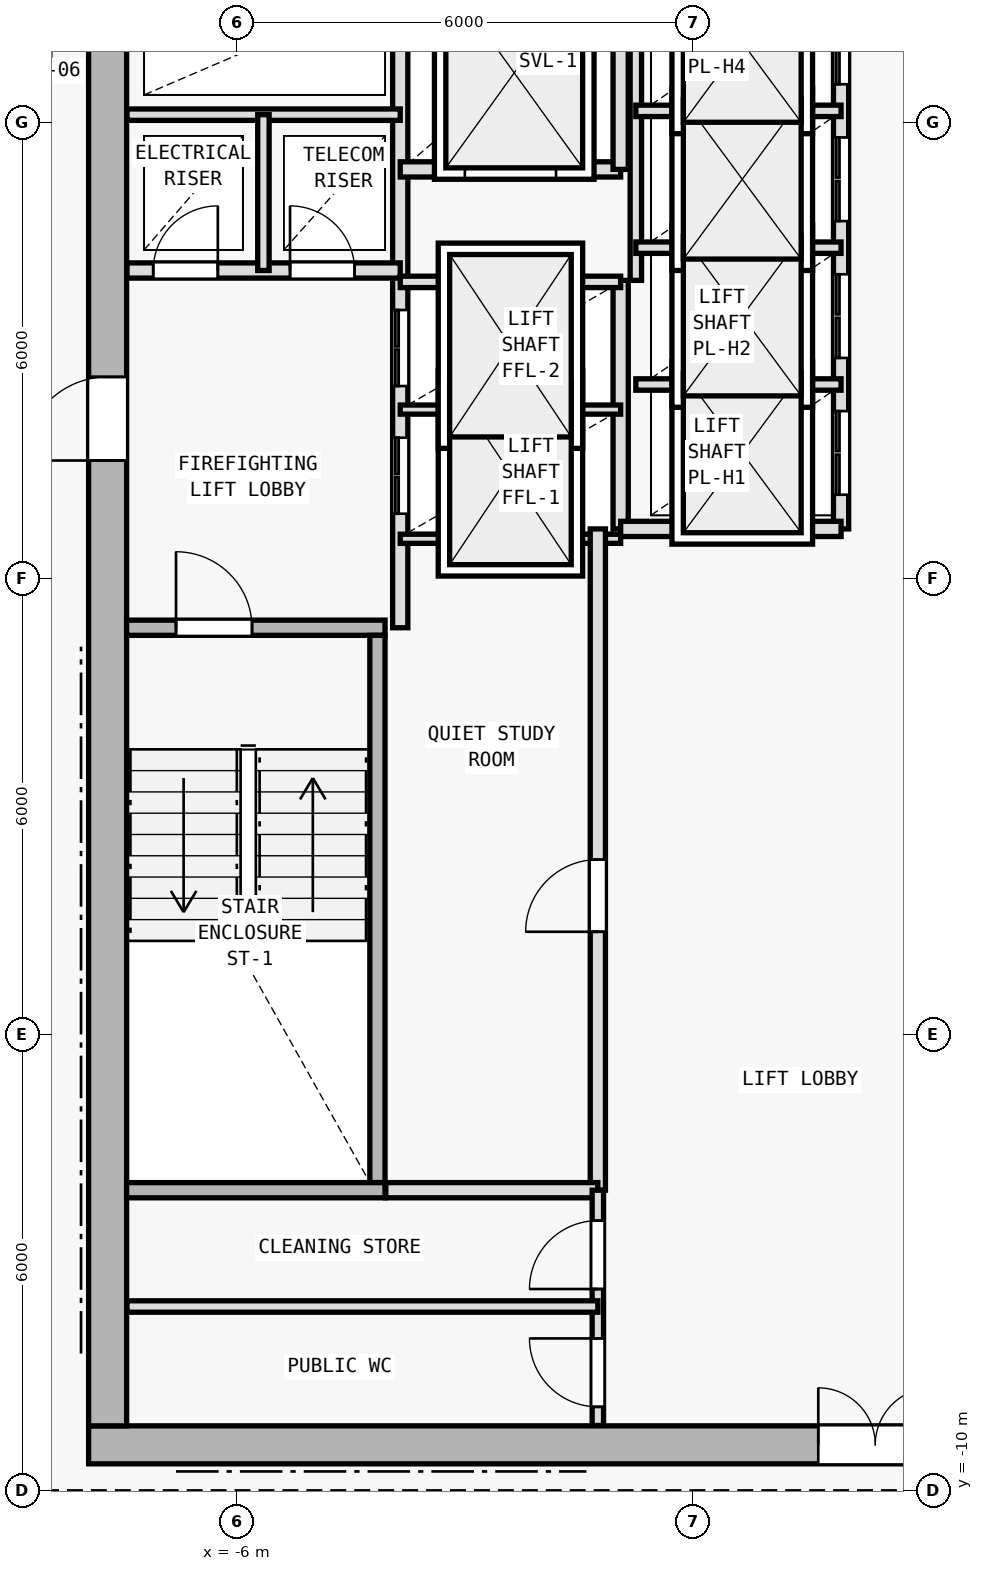
"""IFC4 building model, lengths in metres.
Left out: names, types, materials, properties, quantities, classifications, styles, units other than length and angle.
Written with IfcOpenShell. Run it as: python <this file> out.ifc"""

import sys

from ifc_helpers import new_model, si_unit, direction, frame, frame_2d, origin, origin_2d, place, context, subcontext, project, spatial, rectangle, i_section, extrude, element, fill, save


model = new_model("IFC4")
c1 = context("Model", 3, precision=1e-05, world=origin(), true_north=direction((0.0, 1.0)))
c2 = subcontext(c1, "Body", "Model", "MODEL_VIEW")
j1 = project(units=[si_unit("LENGTHUNIT", "METRE"), si_unit("PLANEANGLEUNIT", "RADIAN")], contexts=[c1])
p1 = place(None, origin())
s1 = spatial("IfcSite", under=j1, at=p1, CompositionType="ELEMENT")
p2 = place(p1, origin())
s2 = spatial("IfcBuilding", under=s1, at=p2, CompositionType="ELEMENT")
p3 = place(p2, frame((0.0, 0.0, 237.9)))
s3 = spatial("IfcBuildingStorey", under=s2, at=p3, CompositionType="ELEMENT", Elevation=237.9)
for number, where, z_axis, x_axis in (
    (1, (-7.7, -9.4, 0.0), (0.0, 0.0, 1.0), (1.0, 0.0, 0.0)),
    (2, (0.0, -9.4, 0.0), (0.0, 0.0, 1.0), (1.0, 0.0, 0.0)),
    (3, (-7.7, 2.0, 0.0), (0.0, 0.0, 1.0), (1.0, 0.0, 0.0)),
):
    element("IfcColumn", number, at=place(p3, frame(where, z_axis=z_axis, x_axis=x_axis)), inside=s3, PredefinedType="COLUMN", context=c2, shape_type="SweptSolid", body=[
        extrude(i_section(OverallWidth=0.398, OverallDepth=0.387, WebThickness=0.013, FlangeThickness=0.022, FilletRadius=0.015, at=origin_2d()), origin(), (0.0, 0.0, 1.0), 3.6),
    ])
p4 = place(p3, frame((-7.95, -9.4, 0.0), z_axis=(0.0, 0.0, 1.0), x_axis=(1.0, 0.0, 0.0)))
e4 = element("IfcWall", 4, at=p4, inside=s3, PredefinedType="SHEAR", context=c2, shape_type="SweptSolid", body=[
    extrude(rectangle(XDim=15.9, YDim=0.5, at=frame_2d((7.95, 0.0))), origin(), (0.0, 0.0, 1.0), 3.28),
])
p5 = place(p4, frame((9.6, 0.0, 0.0)))
e5 = element("IfcOpeningElement", 5, at=p5, cuts=e4, PredefinedType="OPENING", context=c2, shape_type="SweptSolid", body=[
    extrude(rectangle(XDim=1.5, YDim=2.2, at=frame_2d((0.75, 1.1))), frame((0.0, 0.26, 0.0), z_axis=(0.0, -1.0, 0.0), x_axis=(1.0, 0.0, 0.0)), (0.0, 0.0, 1.0), 0.52),
])
p6 = place(p3, frame((-7.7, -9.15, 0.0), z_axis=(0.0, 0.0, 1.0), x_axis=(0.0, 1.0, 0.0)))
e6 = element("IfcWall", 6, at=p6, inside=s3, PredefinedType="SHEAR", context=c2, shape_type="SweptSolid", body=[
    extrude(rectangle(XDim=19.1, YDim=0.5, at=frame_2d((9.55, 0.0))), origin(), (0.0, 0.0, 1.0), 3.28),
])
p7 = place(p6, frame((12.7, 0.0, 0.0)))
e7 = element("IfcOpeningElement", 7, at=p7, cuts=e6, PredefinedType="OPENING", context=c2, shape_type="SweptSolid", body=[
    extrude(rectangle(XDim=1.1, YDim=2.15, at=frame_2d((0.55, 1.075))), frame((0.0, 0.26, 0.0), z_axis=(0.0, -1.0, 0.0), x_axis=(1.0, 0.0, 0.0)), (0.0, 0.0, 1.0), 0.52),
])
p8 = place(p3, frame((-7.45, 1.35, 0.0), z_axis=(0.0, 0.0, 1.0), x_axis=(1.0, 0.0, 0.0)))
e8 = element("IfcWall", 8, at=p8, inside=s3, PredefinedType="SOLIDWALL", context=c2, shape_type="SweptSolid", body=[
    extrude(rectangle(XDim=3.4, YDim=0.2, at=frame_2d((1.7, 0.0))), origin(), (0.0, 0.0, 1.0), 3.28),
])
p9 = place(p8, frame((0.65, 0.0, 0.0)))
e9 = element("IfcOpeningElement", 9, at=p9, cuts=e8, PredefinedType="OPENING", context=c2, shape_type="SweptSolid", body=[
    extrude(rectangle(XDim=1.0, YDim=2.15, at=frame_2d((0.5, 1.075))), frame((0.0, 0.11, 0.0), z_axis=(0.0, -1.0, 0.0), x_axis=(1.0, 0.0, 0.0)), (0.0, 0.0, 1.0), 0.22),
])
p10 = place(p3, frame((-4.15, -5.95, 0.0), z_axis=(0.0, 0.0, 1.0), x_axis=(0.0, 1.0, 0.0)))
e10 = element("IfcWall", 10, at=p10, inside=s3, PredefinedType="SOLIDWALL", context=c2, shape_type="SweptSolid", body=[
    extrude(rectangle(XDim=7.2, YDim=0.2, at=frame_2d((3.6, 0.0))), origin(), (0.0, 0.0, 1.0), 3.28),
])
p11 = place(p3, frame((-3.85, 1.35, 0.0), z_axis=(0.0, 0.0, 1.0), x_axis=(0.0, 1.0, 0.0)))
e11 = element("IfcWall", 11, at=p11, inside=s3, PredefinedType="SOLIDWALL", context=c2, shape_type="SweptSolid", body=[
    extrude(rectangle(XDim=8.595, YDim=0.2, at=frame_2d((4.297, 0.0))), origin(), (0.0, 0.0, 1.0), 3.28),
])
p12 = place(p11, frame((1.5, 0.0, 0.0)))
e12 = element("IfcOpeningElement", 12, at=p12, cuts=e11, PredefinedType="OPENING", context=c2, shape_type="SweptSolid", body=[
    extrude(rectangle(XDim=1.0, YDim=2.15, at=frame_2d((0.5, 1.075))), frame((0.0, 0.11, 0.0), z_axis=(0.0, -1.0, 0.0), x_axis=(1.0, 0.0, 0.0)), (0.0, 0.0, 1.0), 0.22),
])
p13 = place(p11, frame((3.18, 0.0, 0.0)))
e13 = element("IfcOpeningElement", 13, at=p13, cuts=e11, PredefinedType="OPENING", context=c2, shape_type="SweptSolid", body=[
    extrude(rectangle(XDim=1.0, YDim=2.15, at=frame_2d((0.5, 1.075))), frame((0.0, 0.11, 0.0), z_axis=(0.0, -1.0, 0.0), x_axis=(1.0, 0.0, 0.0)), (0.0, 0.0, 1.0), 0.22),
])
p14 = place(p3, frame((-7.445, 6.05, 0.0), z_axis=(0.0, 0.0, 1.0), x_axis=(1.0, 0.0, 0.0)))
e14 = element("IfcWall", 14, at=p14, inside=s3, PredefinedType="SOLIDWALL", context=c2, shape_type="SweptSolid", body=[
    extrude(rectangle(XDim=3.595, YDim=0.2, at=frame_2d((1.797, 0.0))), origin(), (0.0, 0.0, 1.0), 3.28),
])
p15 = place(p14, frame((0.345, 0.0, 0.0)))
e15 = element("IfcOpeningElement", 15, at=p15, cuts=e14, PredefinedType="OPENING", context=c2, shape_type="SweptSolid", body=[
    extrude(rectangle(XDim=0.85, YDim=2.1, at=frame_2d((0.425, 1.05))), frame((0.0, 0.11, 0.0), z_axis=(0.0, -1.0, 0.0), x_axis=(1.0, 0.0, 0.0)), (0.0, 0.0, 1.0), 0.22),
])
p16 = place(p14, frame((2.145, 0.0, 0.0)))
e16 = element("IfcOpeningElement", 16, at=p16, cuts=e14, PredefinedType="OPENING", context=c2, shape_type="SweptSolid", body=[
    extrude(rectangle(XDim=0.85, YDim=2.1, at=frame_2d((0.425, 1.05))), frame((0.0, 0.11, 0.0), z_axis=(0.0, -1.0, 0.0), x_axis=(1.0, 0.0, 0.0)), (0.0, 0.0, 1.0), 0.22),
])
p17 = place(p3, frame((-7.445, 8.1, 0.0), z_axis=(0.0, 0.0, 1.0), x_axis=(1.0, 0.0, 0.0)))
e17 = element("IfcWall", 17, at=p17, inside=s3, PredefinedType="PARTITIONING", context=c2, shape_type="SweptSolid", body=[
    extrude(rectangle(XDim=3.595, YDim=0.15, at=frame_2d((1.797, 0.0))), origin(), (0.0, 0.0, 1.0), 3.28),
])
p18 = place(p3, frame((-5.65, 6.05, 0.0), z_axis=(0.0, 0.0, 1.0), x_axis=(0.0, 1.0, 0.0)))
e18 = element("IfcWall", 18, at=p18, inside=s3, PredefinedType="PARTITIONING", context=c2, shape_type="SweptSolid", body=[
    extrude(rectangle(XDim=2.05, YDim=0.15, at=frame_2d((1.025, 0.0))), origin(), (0.0, 0.0, 1.0), 3.28),
])
p19 = place(p3, frame((-0.95, 2.65, 0.0), z_axis=(0.0, 0.0, 1.0), x_axis=(0.0, 1.0, 0.0)))
e19 = element("IfcWall", 19, at=p19, inside=s3, PredefinedType="SOLIDWALL", context=c2, shape_type="SweptSolid", body=[
    extrude(rectangle(XDim=3.27, YDim=0.2, at=frame_2d((1.635, 0.0))), origin(), (0.0, 0.0, 1.0), 3.28),
])
for number, where, z_axis, x_axis in (
    (20, (-3.85, 2.52, 0.0), (0.0, 0.0, 1.0), (1.0, 0.0, 0.0)),
    (21, (-3.85, 4.22, 0.0), (0.0, 0.0, 1.0), (1.0, 0.0, 0.0)),
):
    element("IfcWall", number, at=place(p3, frame(where, z_axis=z_axis, x_axis=x_axis)), inside=s3, PredefinedType="PARTITIONING", context=c2, shape_type="SweptSolid", body=[
        extrude(rectangle(XDim=2.9, YDim=0.12, at=frame_2d((1.45, 0.0))), origin(), (0.0, 0.0, 1.0), 3.28),
    ])
p20 = place(p3, frame((-3.85, 5.9, 0.0), z_axis=(0.0, 0.0, 1.0), x_axis=(1.0, 0.0, 0.0)))
e22 = element("IfcWall", 22, at=p20, inside=s3, PredefinedType="PARTITIONING", context=c2, shape_type="SweptSolid", body=[
    extrude(rectangle(XDim=2.9, YDim=0.15, at=frame_2d((1.45, 0.0))), origin(), (0.0, 0.0, 1.0), 3.28),
])
p21 = place(p3, frame((-3.85, 7.38, 0.0), z_axis=(0.0, 0.0, 1.0), x_axis=(1.0, 0.0, 0.0)))
e23 = element("IfcWall", 23, at=p21, inside=s3, PredefinedType="SOLIDWALL", context=c2, shape_type="SweptSolid", body=[
    extrude(rectangle(XDim=2.9, YDim=0.2, at=frame_2d((1.45, 0.0))), origin(), (0.0, 0.0, 1.0), 3.28),
])
p22 = place(p21, frame((0.85, 0.0, 0.0)))
e24 = element("IfcOpeningElement", 24, at=p22, cuts=e23, PredefinedType="OPENING", context=c2, shape_type="SweptSolid", body=[
    extrude(rectangle(XDim=1.2, YDim=2.2, at=frame_2d((0.6, 1.1))), frame((0.0, 0.11, 0.0), z_axis=(0.0, -1.0, 0.0), x_axis=(1.0, 0.0, 0.0)), (0.0, 0.0, 1.0), 0.22),
])
p23 = place(p3, frame((-0.95, 7.38, 0.0), z_axis=(0.0, 0.0, 1.0), x_axis=(0.0, 1.0, 0.0)))
e25 = element("IfcWall", 25, at=p23, inside=s3, PredefinedType="SOLIDWALL", context=c2, shape_type="SweptSolid", body=[
    extrude(rectangle(XDim=2.565, YDim=0.2, at=frame_2d((1.283, 0.0))), origin(), (0.0, 0.0, 1.0), 3.28),
])
p24 = place(p3, frame((-1.25, -6.05, 0.0), z_axis=(0.0, 0.0, 1.0), x_axis=(0.0, 1.0, 0.0)))
e26 = element("IfcWall", 26, at=p24, inside=s3, PredefinedType="SOLIDWALL", context=c2, shape_type="SweptSolid", body=[
    extrude(rectangle(XDim=8.7, YDim=0.2, at=frame_2d((4.35, 0.0))), origin(), (0.0, 0.0, 1.0), 3.28),
])
p25 = place(p24, frame((3.4, 0.0, 0.0)))
e27 = element("IfcOpeningElement", 27, at=p25, cuts=e26, PredefinedType="OPENING", context=c2, shape_type="SweptSolid", body=[
    extrude(rectangle(XDim=0.95, YDim=2.1, at=frame_2d((0.475, 1.05))), frame((0.0, 0.11, 0.0), z_axis=(0.0, -1.0, 0.0), x_axis=(1.0, 0.0, 0.0)), (0.0, 0.0, 1.0), 0.22),
])
p26 = place(p3, frame((1.95, 2.65, 0.0), z_axis=(0.0, 0.0, 1.0), x_axis=(0.0, 1.0, 0.0)))
e28 = element("IfcWall", 28, at=p26, inside=s3, PredefinedType="SOLIDWALL", context=c2, shape_type="SweptSolid", body=[
    extrude(rectangle(XDim=7.295, YDim=0.2, at=frame_2d((3.647, 0.0))), origin(), (0.0, 0.0, 1.0), 3.28),
])
p27 = place(p26, frame((0.45, 0.0, 0.0)))
e29 = element("IfcOpeningElement", 29, at=p27, cuts=e28, PredefinedType="OPENING", context=c2, shape_type="SweptSolid", body=[
    extrude(rectangle(XDim=1.1, YDim=2.15, at=frame_2d((0.55, 1.075))), frame((0.0, 0.11, 0.0), z_axis=(0.0, -1.0, 0.0), x_axis=(1.0, 0.0, 0.0)), (0.0, 0.0, 1.0), 0.22),
])
p28 = place(p26, frame((2.25, 0.0, 0.0)))
e30 = element("IfcOpeningElement", 30, at=p28, cuts=e28, PredefinedType="OPENING", context=c2, shape_type="SweptSolid", body=[
    extrude(rectangle(XDim=1.1, YDim=2.15, at=frame_2d((0.55, 1.075))), frame((0.0, 0.11, 0.0), z_axis=(0.0, -1.0, 0.0), x_axis=(1.0, 0.0, 0.0)), (0.0, 0.0, 1.0), 0.22),
])
p29 = place(p26, frame((4.05, 0.0, 0.0)))
e31 = element("IfcOpeningElement", 31, at=p29, cuts=e28, PredefinedType="OPENING", context=c2, shape_type="SweptSolid", body=[
    extrude(rectangle(XDim=1.1, YDim=2.15, at=frame_2d((0.55, 1.075))), frame((0.0, 0.11, 0.0), z_axis=(0.0, -1.0, 0.0), x_axis=(1.0, 0.0, 0.0)), (0.0, 0.0, 1.0), 0.22),
])
p30 = place(p26, frame((5.85, 0.0, 0.0)))
e32 = element("IfcOpeningElement", 32, at=p30, cuts=e28, PredefinedType="OPENING", context=c2, shape_type="SweptSolid", body=[
    extrude(rectangle(XDim=1.1, YDim=2.15, at=frame_2d((0.55, 1.075))), frame((0.0, 0.11, 0.0), z_axis=(0.0, -1.0, 0.0), x_axis=(1.0, 0.0, 0.0)), (0.0, 0.0, 1.0), 0.22),
])
p31 = place(p3, frame((-0.95, 2.65, 0.0), z_axis=(0.0, 0.0, 1.0), x_axis=(1.0, 0.0, 0.0)))
e33 = element("IfcWall", 33, at=p31, inside=s3, PredefinedType="SOLIDWALL", context=c2, shape_type="SweptSolid", body=[
    extrude(rectangle(XDim=2.9, YDim=0.2, at=frame_2d((1.45, 0.0))), origin(), (0.0, 0.0, 1.0), 3.28),
])
p32 = place(p3, frame((-0.75, 5.92, 0.0), z_axis=(0.0, 0.0, 1.0), x_axis=(0.0, 1.0, 0.0)))
e34 = element("IfcWall", 34, at=p32, inside=s3, PredefinedType="PARTITIONING", context=c2, shape_type="SweptSolid", body=[
    extrude(rectangle(XDim=4.025, YDim=0.15, at=frame_2d((2.013, 0.0))), origin(), (0.0, 0.0, 1.0), 3.28),
])
for number, where, z_axis, x_axis in (
    (35, (-0.75, 4.55, 0.0), (0.0, 0.0, 1.0), (1.0, 0.0, 0.0)),
    (36, (-0.75, 6.35, 0.0), (0.0, 0.0, 1.0), (1.0, 0.0, 0.0)),
    (37, (-0.75, 8.15, 0.0), (0.0, 0.0, 1.0), (1.0, 0.0, 0.0)),
):
    element("IfcWall", number, at=place(p3, frame(where, z_axis=z_axis, x_axis=x_axis)), inside=s3, PredefinedType="PARTITIONING", context=c2, shape_type="SweptSolid", body=[
        extrude(rectangle(XDim=2.7, YDim=0.15, at=frame_2d((1.35, 0.0))), origin(), (0.0, 0.0, 1.0), 3.28),
    ])
p33 = place(p3, frame((-7.45, -6.05, 0.0), z_axis=(0.0, 0.0, 1.0), x_axis=(1.0, 0.0, 0.0)))
e38 = element("IfcWall", 38, at=p33, inside=s3, PredefinedType="SOLIDWALL", context=c2, shape_type="SweptSolid", body=[
    extrude(rectangle(XDim=3.4, YDim=0.2, at=frame_2d((1.7, 0.0))), origin(), (0.0, 0.0, 1.0), 3.28),
])
p34 = place(p3, frame((-4.04, -6.05, 0.0), z_axis=(0.0, 0.0, 1.0), x_axis=(1.0, 0.0, 0.0)))
e39 = element("IfcWall", 39, at=p34, inside=s3, PredefinedType="SOLIDWALL", context=c2, shape_type="SweptSolid", body=[
    extrude(rectangle(XDim=2.79, YDim=0.2, at=frame_2d((1.395, 0.0))), origin(), (0.0, 0.0, 1.0), 3.28),
])
p35 = place(p3, frame((-1.25, -9.145, 0.0), z_axis=(0.0, 0.0, 1.0), x_axis=(0.0, 1.0, 0.0)))
e40 = element("IfcWall", 40, at=p35, inside=s3, PredefinedType="PARTITIONING", context=c2, shape_type="SweptSolid", body=[
    extrude(rectangle(XDim=3.095, YDim=0.15, at=frame_2d((1.547, 0.0))), origin(), (0.0, 0.0, 1.0), 3.28),
])
p36 = place(p35, frame((1.795, 0.0, 0.0)))
e41 = element("IfcOpeningElement", 41, at=p36, cuts=e40, PredefinedType="OPENING", context=c2, shape_type="SweptSolid", body=[
    extrude(rectangle(XDim=0.9, YDim=2.1, at=frame_2d((0.45, 1.05))), frame((0.0, 0.085, 0.0), z_axis=(0.0, -1.0, 0.0), x_axis=(1.0, 0.0, 0.0)), (0.0, 0.0, 1.0), 0.17),
])
p37 = place(p35, frame((0.245, 0.0, 0.0)))
e42 = element("IfcOpeningElement", 42, at=p37, cuts=e40, PredefinedType="OPENING", context=c2, shape_type="SweptSolid", body=[
    extrude(rectangle(XDim=0.9, YDim=2.1, at=frame_2d((0.45, 1.05))), frame((0.0, 0.085, 0.0), z_axis=(0.0, -1.0, 0.0), x_axis=(1.0, 0.0, 0.0)), (0.0, 0.0, 1.0), 0.17),
])
p38 = place(p3, frame((-7.445, -7.58, 0.0), z_axis=(0.0, 0.0, 1.0), x_axis=(1.0, 0.0, 0.0)))
e43 = element("IfcWall", 43, at=p38, inside=s3, PredefinedType="PARTITIONING", context=c2, shape_type="SweptSolid", body=[
    extrude(rectangle(XDim=6.195, YDim=0.15, at=frame_2d((3.098, 0.0))), origin(), (0.0, 0.0, 1.0), 3.28),
])
p39 = place(p3, frame((-9.78, 8.226, 0.0), z_axis=(0.0, 0.0, 1.0), x_axis=(0.586956386413, 0.809618552436, 0.0)))
e44 = element("IfcWall", 44, at=p39, inside=s3, PredefinedType="PARTITIONING", context=c2, shape_type="SweptSolid", body=[
    extrude(rectangle(XDim=5.008, YDim=0.15, at=frame_2d((2.504, 0.0))), origin(), (0.0, 0.0, 1.0), 2.905),
])
p40 = place(p39, frame((1.154, 0.0, 0.0)))
e45 = element("IfcOpeningElement", 45, at=p40, cuts=e44, PredefinedType="OPENING", context=c2, shape_type="SweptSolid", body=[
    extrude(rectangle(XDim=0.9, YDim=2.1, at=frame_2d((0.45, 1.05))), frame((0.0, 0.085, 0.0), z_axis=(0.0, -1.0, 0.0), x_axis=(1.0, 0.0, 0.0)), (0.0, 0.0, 1.0), 0.17),
])
p41 = place(p5, origin())
e46 = element("IfcDoor", 46, at=p41, inside=s3, OperationType="DOUBLE_DOOR_SINGLE_SWING", PredefinedType="DOOR", context=c2, shape_type="SweptSolid", body=[
    extrude(rectangle(XDim=1.5, YDim=2.2, at=frame_2d((0.75, 1.1))), frame((0.0, 0.025, 0.0), z_axis=(0.0, -1.0, 0.0), x_axis=(1.0, 0.0, 0.0)), (0.0, 0.0, 1.0), 0.05),
])
fill(e5, e46)
p42 = place(p7, origin())
e47 = element("IfcDoor", 47, at=p42, inside=s3, OperationType="SINGLE_SWING_LEFT", PredefinedType="DOOR", context=c2, shape_type="SweptSolid", body=[
    extrude(rectangle(XDim=1.1, YDim=2.15, at=frame_2d((0.55, 1.075))), frame((0.0, 0.025, 0.0), z_axis=(0.0, -1.0, 0.0), x_axis=(1.0, 0.0, 0.0)), (0.0, 0.0, 1.0), 0.05),
])
fill(e7, e47)
p43 = place(p9, origin())
e48 = element("IfcDoor", 48, at=p43, inside=s3, OperationType="SINGLE_SWING_LEFT", PredefinedType="DOOR", context=c2, shape_type="SweptSolid", body=[
    extrude(rectangle(XDim=1.0, YDim=2.15, at=frame_2d((0.5, 1.075))), frame((0.0, 0.025, 0.0), z_axis=(0.0, -1.0, 0.0), x_axis=(1.0, 0.0, 0.0)), (0.0, 0.0, 1.0), 0.05),
])
fill(e9, e48)
p44 = place(p15, origin())
e49 = element("IfcDoor", 49, at=p44, inside=s3, OperationType="SINGLE_SWING_RIGHT", PredefinedType="DOOR", context=c2, shape_type="SweptSolid", body=[
    extrude(rectangle(XDim=0.85, YDim=2.1, at=frame_2d((0.425, 1.05))), frame((0.0, 0.025, 0.0), z_axis=(0.0, -1.0, 0.0), x_axis=(1.0, 0.0, 0.0)), (0.0, 0.0, 1.0), 0.05),
])
fill(e15, e49)
p45 = place(p16, origin())
e50 = element("IfcDoor", 50, at=p45, inside=s3, OperationType="SINGLE_SWING_LEFT", PredefinedType="DOOR", context=c2, shape_type="SweptSolid", body=[
    extrude(rectangle(XDim=0.85, YDim=2.1, at=frame_2d((0.425, 1.05))), frame((0.0, 0.025, 0.0), z_axis=(0.0, -1.0, 0.0), x_axis=(1.0, 0.0, 0.0)), (0.0, 0.0, 1.0), 0.05),
])
fill(e16, e50)
p46 = place(p22, origin())
e51 = element("IfcDoor", 51, at=p46, inside=s3, OperationType="DOUBLE_DOOR_SLIDING", PredefinedType="DOOR", context=c2, shape_type="SweptSolid", body=[
    extrude(rectangle(XDim=1.2, YDim=2.2, at=frame_2d((0.6, 1.1))), frame((0.0, 0.025, 0.0), z_axis=(0.0, -1.0, 0.0), x_axis=(1.0, 0.0, 0.0)), (0.0, 0.0, 1.0), 0.05),
])
fill(e24, e51)
p47 = place(p25, origin())
e52 = element("IfcDoor", 52, at=p47, inside=s3, OperationType="SINGLE_SWING_LEFT", PredefinedType="DOOR", context=c2, shape_type="SweptSolid", body=[
    extrude(rectangle(XDim=0.95, YDim=2.1, at=frame_2d((0.475, 1.05))), frame((0.0, 0.025, 0.0), z_axis=(0.0, -1.0, 0.0), x_axis=(1.0, 0.0, 0.0)), (0.0, 0.0, 1.0), 0.05),
])
fill(e27, e52)
p48 = place(p27, origin())
e53 = element("IfcDoor", 53, at=p48, inside=s3, OperationType="DOUBLE_DOOR_SLIDING", PredefinedType="DOOR", context=c2, shape_type="SweptSolid", body=[
    extrude(rectangle(XDim=1.1, YDim=2.15, at=frame_2d((0.55, 1.075))), frame((0.0, 0.025, 0.0), z_axis=(0.0, -1.0, 0.0), x_axis=(1.0, 0.0, 0.0)), (0.0, 0.0, 1.0), 0.05),
])
fill(e29, e53)
p49 = place(p28, origin())
e54 = element("IfcDoor", 54, at=p49, inside=s3, OperationType="DOUBLE_DOOR_SLIDING", PredefinedType="DOOR", context=c2, shape_type="SweptSolid", body=[
    extrude(rectangle(XDim=1.1, YDim=2.15, at=frame_2d((0.55, 1.075))), frame((0.0, 0.025, 0.0), z_axis=(0.0, -1.0, 0.0), x_axis=(1.0, 0.0, 0.0)), (0.0, 0.0, 1.0), 0.05),
])
fill(e30, e54)
p50 = place(p29, origin())
e55 = element("IfcDoor", 55, at=p50, inside=s3, OperationType="DOUBLE_DOOR_SLIDING", PredefinedType="DOOR", context=c2, shape_type="SweptSolid", body=[
    extrude(rectangle(XDim=1.1, YDim=2.15, at=frame_2d((0.55, 1.075))), frame((0.0, 0.025, 0.0), z_axis=(0.0, -1.0, 0.0), x_axis=(1.0, 0.0, 0.0)), (0.0, 0.0, 1.0), 0.05),
])
fill(e31, e55)
p51 = place(p30, origin())
e56 = element("IfcDoor", 56, at=p51, inside=s3, OperationType="DOUBLE_DOOR_SLIDING", PredefinedType="DOOR", context=c2, shape_type="SweptSolid", body=[
    extrude(rectangle(XDim=1.1, YDim=2.15, at=frame_2d((0.55, 1.075))), frame((0.0, 0.025, 0.0), z_axis=(0.0, -1.0, 0.0), x_axis=(1.0, 0.0, 0.0)), (0.0, 0.0, 1.0), 0.05),
])
fill(e32, e56)
p52 = place(p12, origin())
e57 = element("IfcDoor", 57, at=p52, inside=s3, OperationType="DOUBLE_DOOR_SLIDING", PredefinedType="DOOR", context=c2, shape_type="SweptSolid", body=[
    extrude(rectangle(XDim=1.0, YDim=2.15, at=frame_2d((0.5, 1.075))), frame((0.0, 0.025, 0.0), z_axis=(0.0, -1.0, 0.0), x_axis=(1.0, 0.0, 0.0)), (0.0, 0.0, 1.0), 0.05),
])
fill(e12, e57)
p53 = place(p13, origin())
e58 = element("IfcDoor", 58, at=p53, inside=s3, OperationType="DOUBLE_DOOR_SLIDING", PredefinedType="DOOR", context=c2, shape_type="SweptSolid", body=[
    extrude(rectangle(XDim=1.0, YDim=2.15, at=frame_2d((0.5, 1.075))), frame((0.0, 0.025, 0.0), z_axis=(0.0, -1.0, 0.0), x_axis=(1.0, 0.0, 0.0)), (0.0, 0.0, 1.0), 0.05),
])
fill(e13, e58)
p54 = place(p36, origin())
e59 = element("IfcDoor", 59, at=p54, inside=s3, OperationType="SINGLE_SWING_LEFT", PredefinedType="DOOR", context=c2, shape_type="SweptSolid", body=[
    extrude(rectangle(XDim=0.9, YDim=2.1, at=frame_2d((0.45, 1.05))), frame((0.0, 0.025, 0.0), z_axis=(0.0, -1.0, 0.0), x_axis=(1.0, 0.0, 0.0)), (0.0, 0.0, 1.0), 0.05),
])
fill(e41, e59)
p55 = place(p37, origin())
e60 = element("IfcDoor", 60, at=p55, inside=s3, OperationType="SINGLE_SWING_RIGHT", PredefinedType="DOOR", context=c2, shape_type="SweptSolid", body=[
    extrude(rectangle(XDim=0.9, YDim=2.1, at=frame_2d((0.45, 1.05))), frame((0.0, 0.025, 0.0), z_axis=(0.0, -1.0, 0.0), x_axis=(1.0, 0.0, 0.0)), (0.0, 0.0, 1.0), 0.05),
])
fill(e42, e60)
save(model, sys.argv[1])
